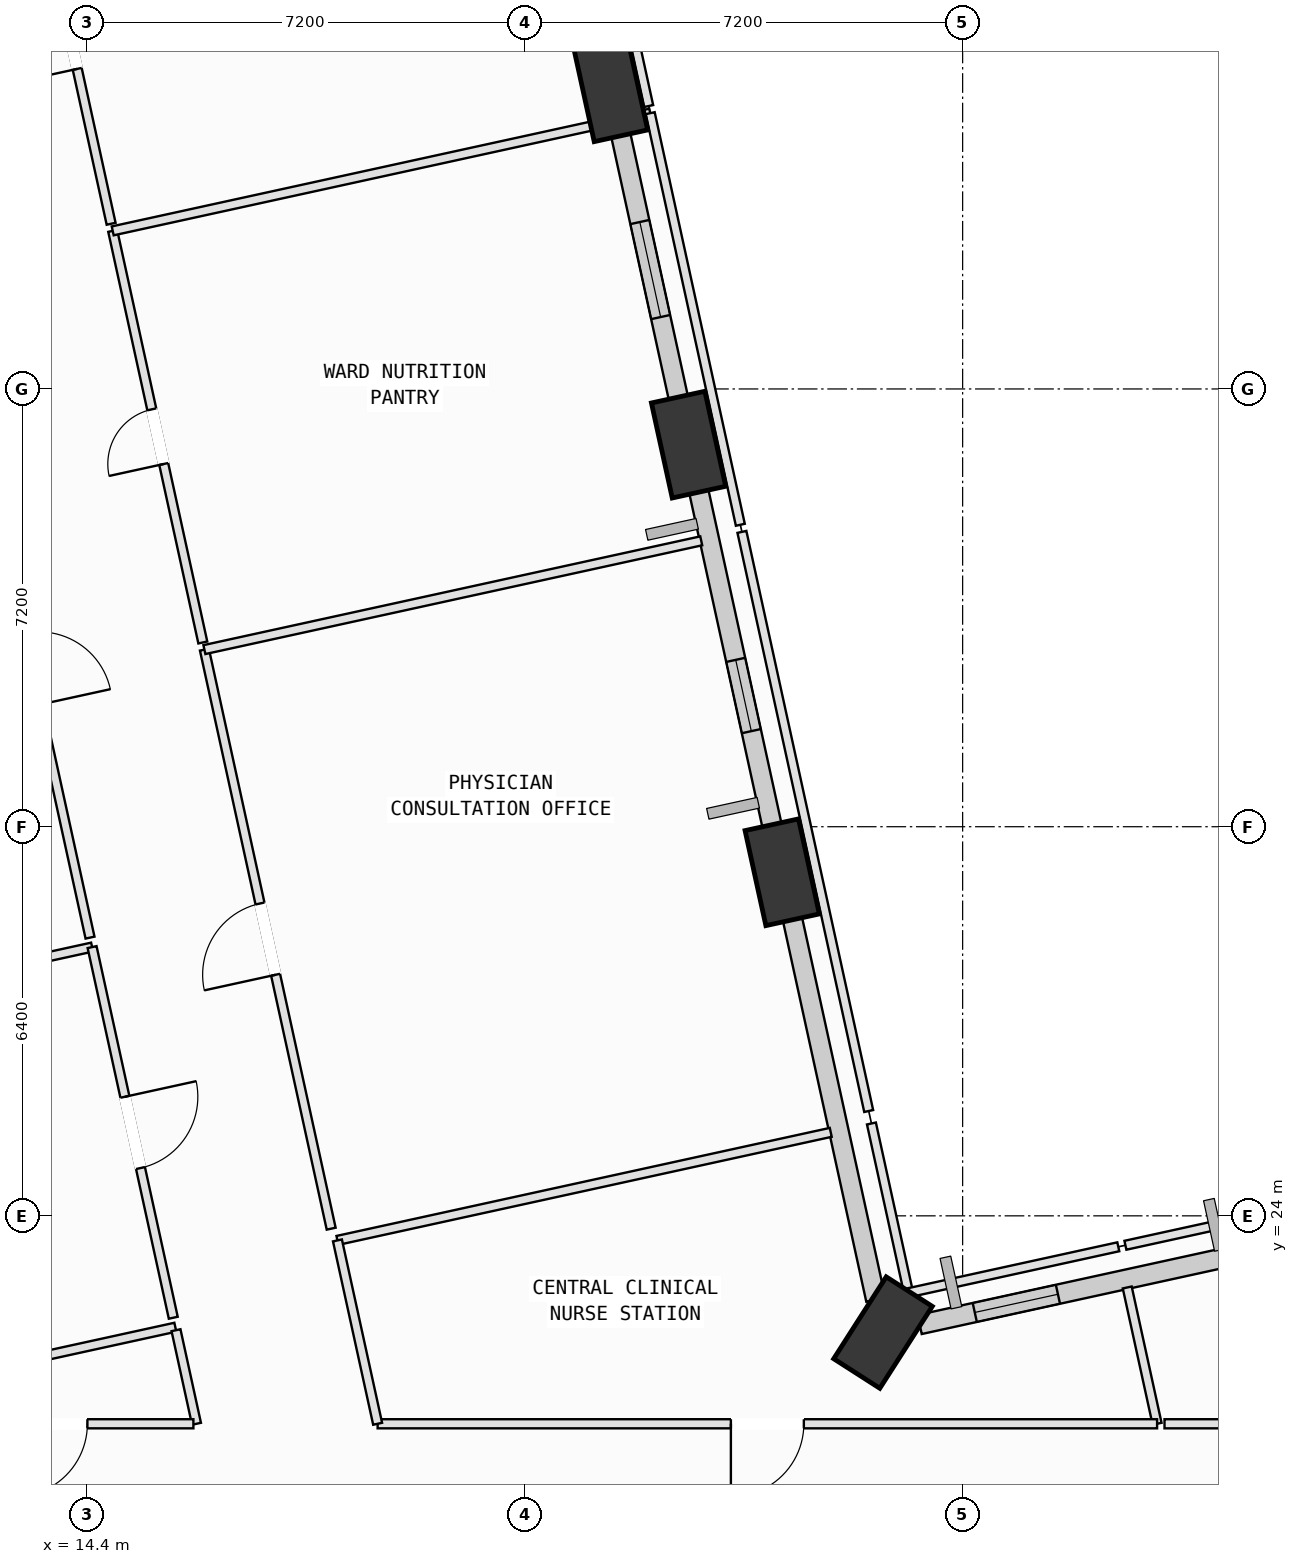
"""IFC4 building model, lengths in metres.
Left out: names, types, materials, properties, quantities, classifications, styles, units other than length and angle.
Written with IfcOpenShell. Run it as: python <this file> out.ifc"""

import sys

from ifc_helpers import new_model, si_unit, direction, frame, frame_2d, origin, origin_2d, place, context, subcontext, project, spatial, rectangle, extrude, element, fill, save


model = new_model("IFC4")
c1 = context("Model", 3, precision=1e-05, world=origin(), true_north=direction((0.0, 1.0)))
c2 = subcontext(c1, "Body", "Model", "MODEL_VIEW")
j1 = project(units=[si_unit("LENGTHUNIT", "METRE"), si_unit("PLANEANGLEUNIT", "RADIAN")], contexts=[c1])
p1 = place(None, origin())
s1 = spatial("IfcSite", under=j1, at=p1, CompositionType="ELEMENT")
p2 = place(p1, origin())
s2 = spatial("IfcBuilding", under=s1, at=p2, CompositionType="ELEMENT")
p3 = place(p2, frame((0.0, 0.0, 75.0)))
s3 = spatial("IfcBuildingStorey", under=s2, at=p3, CompositionType="ELEMENT", Elevation=75.0)
p4 = place(p3, frame((27.49, 22.08, 0.002), z_axis=(0.01148001296, -0.025219390173, 0.999616022111), x_axis=(0.142325742837, 0.989544874094, 0.023330775403)))
e1 = element("IfcColumn", 1, at=p4, inside=s3, PredefinedType="COLUMN", context=c2, shape_type="SweptSolid", body=[
    extrude(rectangle(XDim=1.6, YDim=0.9, at=origin_2d()), origin(), (0.0, 0.0, 1.0), 3.998),
])
p5 = place(p3, frame((25.833, 29.651, 0.002), z_axis=(-0.019839087734, -0.032352973844, 0.999279588344), x_axis=(0.32795379992, 0.943966042203, 0.037073120791)))
e2 = element("IfcColumn", 2, at=p5, inside=s3, PredefinedType="COLUMN", context=c2, shape_type="SweptSolid", body=[
    extrude(rectangle(XDim=1.6, YDim=0.9, at=origin_2d()), origin(), (0.0, 0.0, 1.0), 4.0),
])
p6 = place(p3, frame((24.293, 36.684, 0.002), z_axis=(-0.04883551322, -0.038897699668, 0.998049127853), x_axis=(0.629354777465, 0.774721201746, 0.060988717377)))
e3 = element("IfcColumn", 3, at=p6, inside=s3, PredefinedType="COLUMN", context=c2, shape_type="SweptSolid", body=[
    extrude(rectangle(XDim=1.6, YDim=0.9, at=origin_2d()), origin(), (0.0, 0.0, 1.0), 4.004),
])
p7 = place(p3, frame((23.009, 42.545, 0.002), z_axis=(-0.072915778442, -0.04430942129, 0.99635333313), x_axis=(0.720691851355, 0.688226889689, 0.083348687454)))
e4 = element("IfcColumn", 4, at=p7, inside=s3, PredefinedType="COLUMN", context=c2, shape_type="SweptSolid", body=[
    extrude(rectangle(XDim=1.6, YDim=0.9, at=origin_2d()), origin(), (0.0, 0.0, 1.0), 4.011),
])
p8 = place(p3, frame((28.093, 22.212, 0.0), z_axis=(0.0, 0.0, 1.0), x_axis=(0.976862240577, 0.213869499778, 0.0)))
e5 = element("IfcWall", 5, at=p8, inside=s3, PredefinedType="SOLIDWALL", context=c2, shape_type="SweptSolid", body=[
    extrude(rectangle(XDim=5.736, YDim=0.32, at=frame_2d((2.868, 0.0))), origin(), (0.0, 0.0, 1.0), 3.165),
])
p9 = place(p8, frame((0.928, 0.0, 0.75)))
e6 = element("IfcOpeningElement", 6, at=p9, cuts=e5, PredefinedType="OPENING", context=c2, shape_type="SweptSolid", body=[
    extrude(rectangle(XDim=1.4, YDim=1.85, at=frame_2d((0.7, 0.925))), frame((0.0, 0.17, 0.0), z_axis=(0.0, -1.0, 0.0), x_axis=(1.0, 0.0, 0.0)), (0.0, 0.0, 1.0), 0.34),
])
p10 = place(p3, frame((27.372, 22.621, 0.0), z_axis=(0.0, 0.0, 1.0), x_axis=(-0.213848378678, 0.976866864489, 0.0)))
e7 = element("IfcWall", 7, at=p10, inside=s3, PredefinedType="SOLIDWALL", context=c2, shape_type="SweptSolid", body=[
    extrude(rectangle(XDim=6.536, YDim=0.32, at=frame_2d((3.268, 0.0))), origin(), (0.0, 0.0, 1.0), 2.865),
])
p11 = place(p3, frame((25.715, 30.189, 0.0), z_axis=(0.0, 0.0, 1.0), x_axis=(-0.213872937765, 0.976861487874, 0.0)))
e8 = element("IfcWall", 8, at=p11, inside=s3, PredefinedType="SOLIDWALL", context=c2, shape_type="SweptSolid", body=[
    extrude(rectangle(XDim=5.996, YDim=0.32, at=frame_2d((2.998, 0.0))), origin(), (0.0, 0.0, 1.0), 3.165),
])
p12 = place(p11, frame((1.825, 0.0, 0.75)))
e9 = element("IfcOpeningElement", 9, at=p12, cuts=e8, PredefinedType="OPENING", context=c2, shape_type="SweptSolid", body=[
    extrude(rectangle(XDim=1.2, YDim=1.75, at=frame_2d((0.6, 0.875))), frame((0.0, 0.17, 0.0), z_axis=(0.0, -1.0, 0.0), x_axis=(1.0, 0.0, 0.0)), (0.0, 0.0, 1.0), 0.34),
])
p13 = place(p3, frame((24.177, 37.214, 0.0), z_axis=(0.0, 0.0, 1.0), x_axis=(-0.213875270502, 0.976860977145, 0.0)))
e10 = element("IfcWall", 10, at=p13, inside=s3, PredefinedType="SOLIDWALL", context=c2, shape_type="SweptSolid", body=[
    extrude(rectangle(XDim=4.816, YDim=0.32, at=frame_2d((2.408, 0.0))), origin(), (0.0, 0.0, 1.0), 3.165),
])
p14 = place(p13, frame((1.606, 0.0, 0.75)))
e11 = element("IfcOpeningElement", 11, at=p14, cuts=e10, PredefinedType="OPENING", context=c2, shape_type="SweptSolid", body=[
    extrude(rectangle(XDim=1.6, YDim=1.95, at=frame_2d((0.8, 0.975))), frame((0.0, 0.17, 0.0), z_axis=(0.0, -1.0, 0.0), x_axis=(1.0, 0.0, 0.0)), (0.0, 0.0, 1.0), 0.34),
])
p15 = place(p3, frame((20.554, 47.421, 0.0), z_axis=(0.0, 0.0, 1.0), x_axis=(0.449828356425, -0.89311502605, 0.0)))
e12 = element("IfcWall", 12, at=p15, inside=s3, PredefinedType="SOLIDWALL", context=c2, shape_type="SweptSolid", body=[
    extrude(rectangle(XDim=4.889, YDim=0.32, at=frame_2d((2.444, 0.0))), origin(), (0.0, 0.0, 1.0), 3.165),
])
p16 = place(p15, frame((1.815, 0.0, 0.75)))
e13 = element("IfcOpeningElement", 13, at=p16, cuts=e12, PredefinedType="OPENING", context=c2, shape_type="SweptSolid", body=[
    extrude(rectangle(XDim=2.0, YDim=1.95, at=frame_2d((1.0, 0.975))), frame((0.0, 0.17, 0.0), z_axis=(0.0, -1.0, 0.0), x_axis=(1.0, 0.0, 0.0)), (0.0, 0.0, 1.0), 0.34),
])
p17 = place(p3, frame((6.6, 20.142, 0.0), z_axis=(0.0, 0.0, 1.0), x_axis=(0.976855600785, 0.213899825188, 0.0)))
e14 = element("IfcWall", 14, at=p17, inside=s3, PredefinedType="PARTITIONING", context=c2, shape_type="SweptSolid", body=[
    extrude(rectangle(XDim=9.471, YDim=0.15, at=frame_2d((4.736, 0.0))), origin(), (0.0, 0.0, 1.0), 3.78),
])
p18 = place(p3, frame((15.863, 22.119, 0.0), z_axis=(0.0, 0.0, 1.0), x_axis=(0.213877135487, -0.97686056882, 0.0)))
e15 = element("IfcWall", 15, at=p18, inside=s3, PredefinedType="PARTITIONING", context=c2, shape_type="SweptSolid", body=[
    extrude(rectangle(XDim=1.575, YDim=0.15, at=frame_2d((0.788, 0.0))), origin(), (0.0, 0.0, 1.0), 3.78),
])
p19 = place(p3, frame((16.149, 20.58, 0.0), z_axis=(0.0, 0.0, 1.0), x_axis=(-1.0, 0.0, 0.0)))
e16 = element("IfcWall", 16, at=p19, inside=s3, PredefinedType="PARTITIONING", context=c2, shape_type="SweptSolid", body=[
    extrude(rectangle(XDim=6.964, YDim=0.15, at=frame_2d((3.482, 0.0))), origin(), (0.0, 0.0, 1.0), 3.78),
])
p20 = place(p19, frame((1.743, 0.0, 0.0)))
e17 = element("IfcOpeningElement", 17, at=p20, cuts=e16, PredefinedType="OPENING", context=c2, shape_type="SweptSolid", body=[
    extrude(rectangle(XDim=1.2, YDim=2.15, at=frame_2d((0.6, 1.075))), frame((0.0, 0.085, 0.0), z_axis=(0.0, -1.0, 0.0), x_axis=(1.0, 0.0, 0.0)), (0.0, 0.0, 1.0), 0.17),
])
p21 = place(p3, frame((5.286, 26.406, 0.0), z_axis=(0.0, 0.0, 1.0), x_axis=(0.976854150105, 0.213906450166, 0.0)))
e18 = element("IfcWall", 18, at=p21, inside=s3, PredefinedType="PARTITIONING", context=c2, shape_type="SweptSolid", body=[
    extrude(rectangle(XDim=9.415, YDim=0.15, at=frame_2d((4.708, 0.0))), origin(), (0.0, 0.0, 1.0), 3.78),
])
p22 = place(p3, frame((14.483, 28.42, 0.0), z_axis=(0.0, 0.0, 1.0), x_axis=(0.213959387343, -0.976842556694, 0.0)))
e19 = element("IfcWall", 19, at=p22, inside=s3, PredefinedType="PARTITIONING", context=c2, shape_type="SweptSolid", body=[
    extrude(rectangle(XDim=6.24, YDim=0.15, at=frame_2d((3.12, 0.0))), origin(), (0.0, 0.0, 1.0), 3.78),
])
p23 = place(p22, frame((2.52, 0.0, 0.0)))
e20 = element("IfcOpeningElement", 20, at=p23, cuts=e19, PredefinedType="OPENING", context=c2, shape_type="SweptSolid", body=[
    extrude(rectangle(XDim=1.2, YDim=2.15, at=frame_2d((0.6, 1.075))), frame((0.0, 0.085, 0.0), z_axis=(0.0, -1.0, 0.0), x_axis=(1.0, 0.0, 0.0)), (0.0, 0.0, 1.0), 0.17),
])
p24 = place(p3, frame((12.516, 37.407, 0.0), z_axis=(0.0, 0.0, 1.0), x_axis=(0.213809634747, -0.976875345215, 0.0)))
e21 = element("IfcWall", 21, at=p24, inside=s3, PredefinedType="PARTITIONING", context=c2, shape_type="SweptSolid", body=[
    extrude(rectangle(XDim=9.04, YDim=0.15, at=frame_2d((4.52, 0.0))), origin(), (0.0, 0.0, 1.0), 2.865),
])
p25 = place(p24, frame((3.92, 0.0, 0.0)))
e22 = element("IfcOpeningElement", 22, at=p25, cuts=e21, PredefinedType="OPENING", context=c2, shape_type="SweptSolid", body=[
    extrude(rectangle(XDim=1.2, YDim=2.15, at=frame_2d((0.6, 1.075))), frame((0.0, 0.085, 0.0), z_axis=(0.0, -1.0, 0.0), x_axis=(1.0, 0.0, 0.0)), (0.0, 0.0, 1.0), 0.17),
])
p26 = place(p3, frame((18.518, 23.596, 0.0), z_axis=(0.0, 0.0, 1.0), x_axis=(0.97684033918, 0.213969511266, 0.0)))
e23 = element("IfcWall", 23, at=p26, inside=s3, PredefinedType="PARTITIONING", context=c2, shape_type="SweptSolid", body=[
    extrude(rectangle(XDim=8.305, YDim=0.15, at=frame_2d((4.153, 0.0))), origin(), (0.0, 0.0, 1.0), 3.78),
])
p27 = place(p3, frame((27.3, 25.519, 0.0), z_axis=(0.0, 0.0, 1.0), x_axis=(0.213990668266, -0.976835704658, 0.0)))
e24 = element("IfcWall", 24, at=p27, inside=s3, PredefinedType="PARTITIONING", context=c2, shape_type="SweptSolid", body=[
    extrude(rectangle(XDim=2.85, YDim=0.15, at=frame_2d((1.425, 0.0))), origin(), (0.0, 0.0, 1.0), 3.78),
])
p28 = place(p3, frame((27.91, 22.735, 0.0), z_axis=(0.0, 0.0, 1.0), x_axis=(0.976833231196, 0.214001958943, 0.0)))
e25 = element("IfcWall", 25, at=p28, inside=s3, PredefinedType="PARTITIONING", context=c2, shape_type="SweptSolid", body=[
    extrude(rectangle(XDim=3.532, YDim=0.15, at=frame_2d((1.766, 0.0))), origin(), (0.0, 0.0, 1.0), 3.78),
])
p29 = place(p3, frame((31.507, 22.822, 0.0), z_axis=(0.0, 0.0, 1.0), x_axis=(0.213922116601, -0.976850719419, 0.0)))
e26 = element("IfcWall", 26, at=p29, inside=s3, PredefinedType="PARTITIONING", context=c2, shape_type="SweptSolid", body=[
    extrude(rectangle(XDim=2.295, YDim=0.15, at=frame_2d((1.147, 0.0))), origin(), (0.0, 0.0, 1.0), 3.78),
])
p30 = place(p3, frame((31.998, 20.58, 0.0), z_axis=(0.0, 0.0, 1.0), x_axis=(-1.0, 0.0, 0.0)))
e27 = element("IfcWall", 27, at=p30, inside=s3, PredefinedType="PARTITIONING", context=c2, shape_type="SweptSolid", body=[
    extrude(rectangle(XDim=12.819, YDim=0.15, at=frame_2d((6.41, 0.0))), origin(), (0.0, 0.0, 1.0), 3.78),
])
p31 = place(p30, frame((5.81, 0.0, 0.0)))
e28 = element("IfcOpeningElement", 28, at=p31, cuts=e27, PredefinedType="OPENING", context=c2, shape_type="SweptSolid", body=[
    extrude(rectangle(XDim=1.2, YDim=2.15, at=frame_2d((0.6, 1.075))), frame((0.0, 0.085, 0.0), z_axis=(0.0, -1.0, 0.0), x_axis=(1.0, 0.0, 0.0)), (0.0, 0.0, 1.0), 0.17),
])
p32 = place(p3, frame((19.179, 20.58, 0.0), z_axis=(0.0, 0.0, 1.0), x_axis=(-0.214057678947, 0.976821022544, 0.0)))
e29 = element("IfcWall", 29, at=p32, inside=s3, PredefinedType="PARTITIONING", context=c2, shape_type="SweptSolid", body=[
    extrude(rectangle(XDim=3.087, YDim=0.15, at=frame_2d((1.544, 0.0))), origin(), (0.0, 0.0, 1.0), 3.78),
])
p33 = place(p3, frame((38.0, 20.58, 0.0), z_axis=(0.0, 0.0, 1.0), x_axis=(-1.0, 0.0, 0.0)))
e30 = element("IfcWall", 30, at=p33, inside=s3, PredefinedType="PARTITIONING", context=c2, shape_type="SweptSolid", body=[
    extrude(rectangle(XDim=5.88, YDim=0.15, at=frame_2d((2.94, 0.0))), origin(), (0.0, 0.0, 1.0), 3.365),
])
p34 = place(p3, frame((31.477, 23.516, 0.0), z_axis=(0.0, 0.0, 1.0), x_axis=(0.976858171476, 0.213888084802, 0.0)))
e31 = element("IfcWall", 31, at=p34, inside=s3, PredefinedType="PARTITIONING", context=c2, shape_type="SweptSolid", body=[
    extrude(rectangle(XDim=15.231, YDim=0.15, at=frame_2d((7.616, 0.0))), origin(), (0.0, 0.0, 1.0), 3.165),
])
p35 = place(p3, frame((18.415, 23.789, 0.0), z_axis=(0.0, 0.0, 1.0), x_axis=(-0.213853705806, 0.976865698299, 0.0)))
e32 = element("IfcWall", 32, at=p35, inside=s3, PredefinedType="PARTITIONING", context=c2, shape_type="SweptSolid", body=[
    extrude(rectangle(XDim=9.75, YDim=0.15, at=frame_2d((4.875, 0.0))), origin(), (0.0, 0.0, 1.0), 3.78),
])
p36 = place(p35, frame((4.275, 0.0, 0.0)))
e33 = element("IfcOpeningElement", 33, at=p36, cuts=e32, PredefinedType="OPENING", context=c2, shape_type="SweptSolid", body=[
    extrude(rectangle(XDim=1.2, YDim=2.15, at=frame_2d((0.6, 1.075))), frame((0.0, 0.085, 0.0), z_axis=(0.0, -1.0, 0.0), x_axis=(1.0, 0.0, 0.0)), (0.0, 0.0, 1.0), 0.17),
])
p37 = place(p3, frame((16.33, 33.313, 0.0), z_axis=(0.0, 0.0, 1.0), x_axis=(0.976858107434, 0.213888377294, 0.0)))
e34 = element("IfcWall", 34, at=p37, inside=s3, PredefinedType="PARTITIONING", context=c2, shape_type="SweptSolid", body=[
    extrude(rectangle(XDim=8.365, YDim=0.15, at=frame_2d((4.182, 0.0))), origin(), (0.0, 0.0, 1.0), 3.78),
])
p38 = place(p3, frame((25.17, 35.249, 0.0), z_axis=(0.0, 0.0, 1.0), x_axis=(0.213832782559, -0.976870278544, 0.0)))
e35 = element("IfcWall", 35, at=p38, inside=s3, PredefinedType="PARTITIONING", context=c2, shape_type="SweptSolid", body=[
    extrude(rectangle(XDim=9.75, YDim=0.15, at=frame_2d((4.875, 0.0))), origin(), (0.0, 0.0, 1.0), 3.78),
])
p39 = place(p3, frame((16.304, 33.43, 0.0), z_axis=(0.0, 0.0, 1.0), x_axis=(-0.213833454661, 0.976870131424, 0.0)))
e36 = element("IfcWall", 36, at=p39, inside=s3, PredefinedType="PARTITIONING", context=c2, shape_type="SweptSolid", body=[
    extrude(rectangle(XDim=6.93, YDim=0.15, at=frame_2d((3.465, 0.0))), origin(), (0.0, 0.0, 1.0), 3.78),
])
p40 = place(p39, frame((3.005, 0.0, 0.0)))
e37 = element("IfcOpeningElement", 37, at=p40, cuts=e36, PredefinedType="OPENING", context=c2, shape_type="SweptSolid", body=[
    extrude(rectangle(XDim=0.92, YDim=2.1, at=frame_2d((0.46, 1.05))), frame((0.0, 0.085, 0.0), z_axis=(0.0, -1.0, 0.0), x_axis=(1.0, 0.0, 0.0)), (0.0, 0.0, 1.0), 0.17),
])
p41 = place(p3, frame((14.822, 40.2, 0.0), z_axis=(0.0, 0.0, 1.0), x_axis=(0.976860427396, 0.213877781427, 0.0)))
e38 = element("IfcWall", 38, at=p41, inside=s3, PredefinedType="PARTITIONING", context=c2, shape_type="SweptSolid", body=[
    extrude(rectangle(XDim=8.412, YDim=0.15, at=frame_2d((4.206, 0.0))), origin(), (0.0, 0.0, 1.0), 3.78),
])
p42 = place(p3, frame((23.211, 42.037, 0.0), z_axis=(0.0, 0.0, 1.0), x_axis=(0.97681718406, 0.214075194559, 0.0)))
e39 = element("IfcWall", 39, at=p42, inside=s3, PredefinedType="PARTITIONING", context=c2, shape_type="SweptSolid", body=[
    extrude(rectangle(XDim=0.462, YDim=0.15, at=frame_2d((0.231, 0.0))), origin(), (0.0, 0.0, 1.0), 3.78),
])
p43 = place(p3, frame((23.662, 42.136, 0.0), z_axis=(0.0, 0.0, 1.0), x_axis=(0.213833454661, -0.976870131424, 0.0)))
e40 = element("IfcWall", 40, at=p43, inside=s3, PredefinedType="PARTITIONING", context=c2, shape_type="SweptSolid", body=[
    extrude(rectangle(XDim=6.93, YDim=0.15, at=frame_2d((3.465, 0.0))), origin(), (0.0, 0.0, 1.0), 3.78),
])
p44 = place(p3, frame((22.499, 47.45, 0.0), z_axis=(0.0, 0.0, 1.0), x_axis=(0.213892579963, -0.976857187227, 0.0)))
e41 = element("IfcWall", 41, at=p44, inside=s3, PredefinedType="PARTITIONING", context=c2, shape_type="SweptSolid", body=[
    extrude(rectangle(XDim=5.32, YDim=0.15, at=frame_2d((2.66, 0.0))), origin(), (0.0, 0.0, 1.0), 3.78),
])
p45 = place(p3, frame((14.796, 40.317, 0.0), z_axis=(0.0, 0.0, 1.0), x_axis=(-0.213853530585, 0.976865736658, 0.0)))
e42 = element("IfcWall", 42, at=p45, inside=s3, PredefinedType="PARTITIONING", context=c2, shape_type="SweptSolid", body=[
    extrude(rectangle(XDim=6.135, YDim=0.15, at=frame_2d((3.067, 0.0))), origin(), (0.0, 0.0, 1.0), 3.78),
])
p46 = place(p45, frame((2.607, 0.0, 0.0)))
e43 = element("IfcOpeningElement", 43, at=p46, cuts=e42, PredefinedType="OPENING", context=c2, shape_type="SweptSolid", body=[
    extrude(rectangle(XDim=0.92, YDim=2.1, at=frame_2d((0.46, 1.05))), frame((0.0, 0.085, 0.0), z_axis=(0.0, -1.0, 0.0), x_axis=(1.0, 0.0, 0.0)), (0.0, 0.0, 1.0), 0.17),
])
p47 = place(p9, origin())
e44 = element("IfcWindow", 44, at=p47, inside=s3, PartitioningType="SINGLE_PANEL", PredefinedType="WINDOW", context=c2, shape_type="SweptSolid", body=[
    extrude(rectangle(XDim=1.4, YDim=1.85, at=frame_2d((0.7, 0.925))), frame((0.0, 0.03, 0.0), z_axis=(0.0, -1.0, 0.0), x_axis=(1.0, 0.0, 0.0)), (0.0, 0.0, 1.0), 0.06),
])
fill(e6, e44)
p48 = place(p12, origin())
e45 = element("IfcWindow", 45, at=p48, inside=s3, PartitioningType="SINGLE_PANEL", PredefinedType="WINDOW", context=c2, shape_type="SweptSolid", body=[
    extrude(rectangle(XDim=1.2, YDim=1.75, at=frame_2d((0.6, 0.875))), frame((0.0, 0.03, 0.0), z_axis=(0.0, -1.0, 0.0), x_axis=(1.0, 0.0, 0.0)), (0.0, 0.0, 1.0), 0.06),
])
fill(e9, e45)
p49 = place(p14, origin())
e46 = element("IfcWindow", 46, at=p49, inside=s3, PartitioningType="SINGLE_PANEL", PredefinedType="WINDOW", context=c2, shape_type="SweptSolid", body=[
    extrude(rectangle(XDim=1.6, YDim=1.95, at=frame_2d((0.8, 0.975))), frame((0.0, 0.03, 0.0), z_axis=(0.0, -1.0, 0.0), x_axis=(1.0, 0.0, 0.0)), (0.0, 0.0, 1.0), 0.06),
])
fill(e11, e46)
p50 = place(p20, origin())
e47 = element("IfcDoor", 47, at=p50, inside=s3, OperationType="SINGLE_SWING_RIGHT", PredefinedType="DOOR", context=c2, shape_type="SweptSolid", body=[
    extrude(rectangle(XDim=1.2, YDim=2.15, at=frame_2d((0.6, 1.075))), frame((0.0, 0.025, 0.0), z_axis=(0.0, -1.0, 0.0), x_axis=(1.0, 0.0, 0.0)), (0.0, 0.0, 1.0), 0.05),
])
fill(e17, e47)
p51 = place(p23, origin())
e48 = element("IfcDoor", 48, at=p51, inside=s3, OperationType="SINGLE_SWING_LEFT", PredefinedType="DOOR", context=c2, shape_type="SweptSolid", body=[
    extrude(rectangle(XDim=1.2, YDim=2.15, at=frame_2d((0.6, 1.075))), frame((0.0, 0.025, 0.0), z_axis=(0.0, -1.0, 0.0), x_axis=(1.0, 0.0, 0.0)), (0.0, 0.0, 1.0), 0.05),
])
fill(e20, e48)
p52 = place(p31, origin())
e49 = element("IfcDoor", 49, at=p52, inside=s3, OperationType="SINGLE_SWING_RIGHT", PredefinedType="DOOR", context=c2, shape_type="SweptSolid", body=[
    extrude(rectangle(XDim=1.2, YDim=2.15, at=frame_2d((0.6, 1.075))), frame((0.0, 0.025, 0.0), z_axis=(0.0, -1.0, 0.0), x_axis=(1.0, 0.0, 0.0)), (0.0, 0.0, 1.0), 0.05),
])
fill(e28, e49)
p53 = place(p36, origin())
e50 = element("IfcDoor", 50, at=p53, inside=s3, OperationType="SINGLE_SWING_LEFT", PredefinedType="DOOR", context=c2, shape_type="SweptSolid", body=[
    extrude(rectangle(XDim=1.2, YDim=2.15, at=frame_2d((0.6, 1.075))), frame((0.0, 0.025, 0.0), z_axis=(0.0, -1.0, 0.0), x_axis=(1.0, 0.0, 0.0)), (0.0, 0.0, 1.0), 0.05),
])
fill(e33, e50)
p54 = place(p40, origin())
e51 = element("IfcDoor", 51, at=p54, inside=s3, OperationType="SINGLE_SWING_LEFT", PredefinedType="DOOR", context=c2, shape_type="SweptSolid", body=[
    extrude(rectangle(XDim=0.92, YDim=2.1, at=frame_2d((0.46, 1.05))), frame((0.0, 0.025, 0.0), z_axis=(0.0, -1.0, 0.0), x_axis=(1.0, 0.0, 0.0)), (0.0, 0.0, 1.0), 0.05),
])
fill(e37, e51)
p55 = place(p46, origin())
e52 = element("IfcDoor", 52, at=p55, inside=s3, OperationType="SINGLE_SWING_LEFT", PredefinedType="DOOR", context=c2, shape_type="SweptSolid", body=[
    extrude(rectangle(XDim=0.92, YDim=2.1, at=frame_2d((0.46, 1.05))), frame((0.0, 0.025, 0.0), z_axis=(0.0, -1.0, 0.0), x_axis=(1.0, 0.0, 0.0)), (0.0, 0.0, 1.0), 0.05),
])
fill(e43, e52)
save(model, sys.argv[1])
